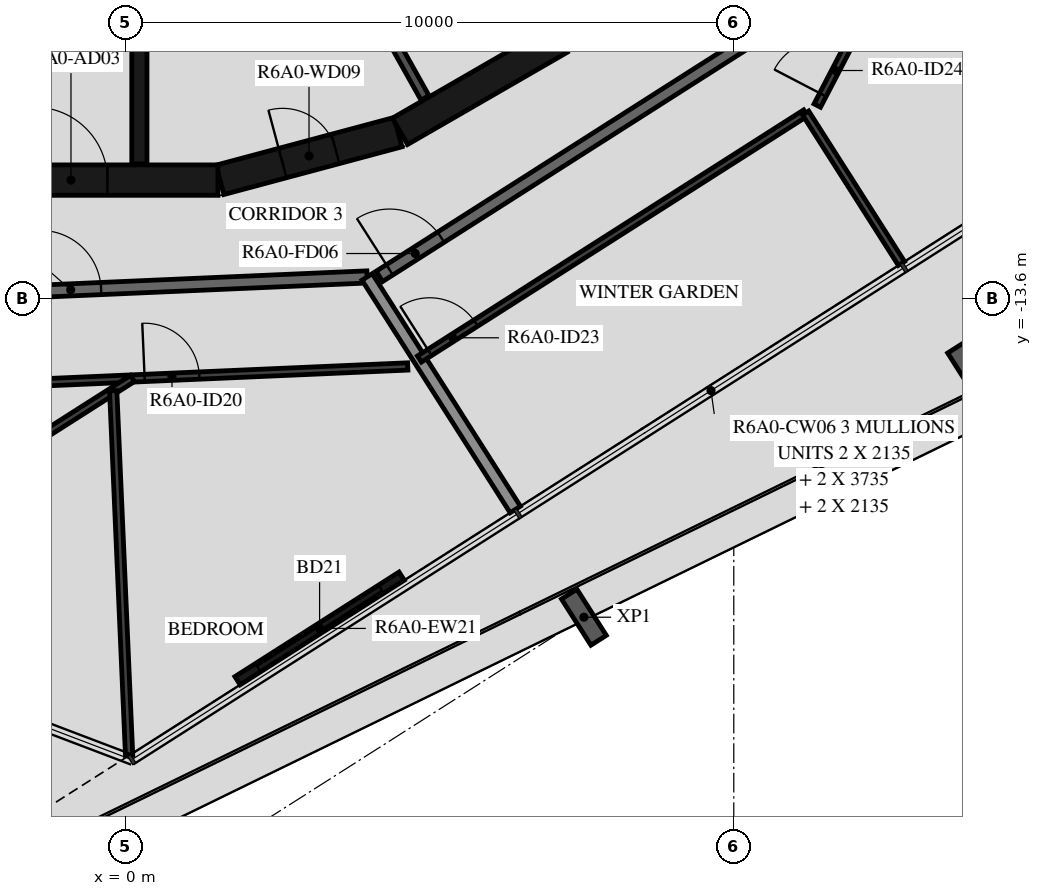
"""IFC4 building model, lengths in metres.
Left out: names, types, materials, properties, quantities, classifications, styles, units other than length and angle.
Written with IfcOpenShell. Run it as: python <this file> out.ifc"""

import sys

from ifc_helpers import new_model, si_unit, direction, frame, frame_2d, origin, origin_2d, place, context, subcontext, project, spatial, rectangle, i_section, extrude, element, fill, save


model = new_model("IFC4")
c1 = context("Model", 3, precision=1e-05, world=origin(), true_north=direction((0.0, 1.0)))
c2 = subcontext(c1, "Body", "Model", "MODEL_VIEW")
j1 = project(units=[si_unit("LENGTHUNIT", "METRE"), si_unit("PLANEANGLEUNIT", "RADIAN")], contexts=[c1])
p1 = place(None, origin())
s1 = spatial("IfcSite", under=j1, at=p1, CompositionType="ELEMENT")
p2 = place(p1, origin())
s2 = spatial("IfcBuilding", under=s1, at=p2, CompositionType="ELEMENT")
p3 = place(p2, frame((0.0, 0.0, 226.7)))
s3 = spatial("IfcBuildingStorey", under=s2, at=p3, CompositionType="ELEMENT", Elevation=226.7)
for number, where, z_axis, x_axis in (
    (1, (13.886, -14.79, -0.45), (0.0, 0.0, 1.0), (-0.843, -0.537, 0.0)),
    (2, (7.535, -18.835, -0.45), (0.0, 0.0, 1.0), (-0.843, -0.537, 0.0)),
):
    element("IfcColumn", number, at=place(p3, frame(where, z_axis=z_axis, x_axis=x_axis)), inside=s3, PredefinedType="COLUMN", context=c2, shape_type="SweptSolid", body=[
        extrude(i_section(OverallWidth=0.3, OverallDepth=0.9, WebThickness=0.019, FlangeThickness=0.035, FilletRadius=0.03, at=origin_2d()), origin(), (0.0, 0.0, 1.0), 3.57),
    ])
p4 = place(p3, frame((1.839, -19.879, 0.0), z_axis=(0.0, 0.0, 1.0), x_axis=(0.843419508298, 0.53725555653, 0.0)))
e3 = element("IfcWall", 3, at=p4, inside=s3, PredefinedType="STANDARD", context=c2, shape_type="SweptSolid", body=[
    extrude(rectangle(XDim=3.2, YDim=0.16, at=frame_2d((1.6, 0.0))), origin(), (0.0, 0.0, 1.0), 3.12),
])
p5 = place(p4, frame((0.4, 0.0, 0.0)))
e4 = element("IfcOpeningElement", 4, at=p5, cuts=e3, PredefinedType="OPENING", context=c2, shape_type="SweptSolid", body=[
    extrude(rectangle(XDim=2.4, YDim=2.4, at=frame_2d((1.2, 1.2))), frame((0.0, 0.09, 0.0), z_axis=(0.0, -1.0, 0.0), x_axis=(1.0, 0.0, 0.0)), (0.0, 0.0, 1.0), 0.18),
])
p6 = place(p3, frame((1.55, -11.643, 0.0), z_axis=(0.0, 0.0, 1.0), x_axis=(0.965948410781, 0.258734743916, 0.0)))
e5 = element("IfcWall", 5, at=p6, inside=s3, PredefinedType="SHEAR", context=c2, shape_type="SweptSolid", body=[
    extrude(rectangle(XDim=3.033, YDim=0.5, at=frame_2d((1.516, 0.0))), origin(), (0.0, 0.0, 1.0), 3.12),
])
p7 = place(p6, frame((1.066, 0.0, 0.0)))
e6 = element("IfcOpeningElement", 6, at=p7, cuts=e5, PredefinedType="OPENING", context=c2, shape_type="SweptSolid", body=[
    extrude(rectangle(XDim=0.9, YDim=2.1, at=frame_2d((0.45, 1.05))), frame((0.0, 0.26, 0.0), z_axis=(0.0, -1.0, 0.0), x_axis=(1.0, 0.0, 0.0)), (0.0, 0.0, 1.0), 0.52),
])
p8 = place(p3, frame((4.51, -10.845, 0.0), z_axis=(0.0, 0.0, 1.0), x_axis=(0.865975092491, 0.500087131594, 0.0)))
e7 = element("IfcWall", 7, at=p8, inside=s3, PredefinedType="SHEAR", context=c2, shape_type="SweptSolid", body=[
    extrude(rectangle(XDim=3.033, YDim=0.5, at=frame_2d((1.516, 0.0))), origin(), (0.0, 0.0, 1.0), 3.12),
])
p9 = place(p3, frame((-1.516, -11.647, 0.0), z_axis=(0.0, 0.0, 1.0), x_axis=(1.0, 0.0, 0.0)))
e8 = element("IfcWall", 8, at=p9, inside=s3, PredefinedType="SHEAR", context=c2, shape_type="SweptSolid", body=[
    extrude(rectangle(XDim=3.033, YDim=0.5, at=frame_2d((1.516, 0.0))), origin(), (0.0, 0.0, 1.0), 3.12),
])
p10 = place(p9, frame((0.016, 0.0, 0.0)))
e9 = element("IfcOpeningElement", 9, at=p10, cuts=e8, PredefinedType="OPENING", context=c2, shape_type="SweptSolid", body=[
    extrude(rectangle(XDim=1.2, YDim=2.1, at=frame_2d((0.6, 1.05))), frame((0.0, 0.26, 0.0), z_axis=(0.0, -1.0, 0.0), x_axis=(1.0, 0.0, 0.0)), (0.0, 0.0, 1.0), 0.52),
])
p11 = place(p3, frame((0.225, -8.97, 0.0), z_axis=(0.0, 0.0, 1.0), x_axis=(0.0, -1.0, 0.0)))
e10 = element("IfcWall", 10, at=p11, inside=s3, PredefinedType="SHEAR", context=c2, shape_type="SweptSolid", body=[
    extrude(rectangle(XDim=2.41, YDim=0.25, at=frame_2d((1.205, 0.0))), origin(), (0.0, 0.0, 1.0), 3.12),
])
p12 = place(p3, frame((4.922, -10.296, 0.0), z_axis=(0.0, 0.0, 1.0), x_axis=(-0.48860846254, 0.872503163509, 0.0)))
e11 = element("IfcWall", 11, at=p12, inside=s3, PredefinedType="PARTITIONING", context=c2, shape_type="SweptSolid", body=[
    extrude(rectangle(XDim=1.459, YDim=0.15, at=frame_2d((0.73, 0.0))), origin(), (0.0, 0.0, 1.0), 3.12),
])
p13 = place(p3, frame((-3.003, -13.544, 0.0), z_axis=(0.0, 0.0, 1.0), x_axis=(0.999048221872, 0.043619380718, 0.0)))
e12 = element("IfcWall", 12, at=p13, inside=s3, PredefinedType="STANDARD", context=c2, shape_type="SweptSolid", body=[
    extrude(rectangle(XDim=6.979, YDim=0.2, at=frame_2d((3.49, 0.0))), origin(), (0.0, 0.0, 1.0), 3.12),
])
p14 = place(p13, frame((1.6, 0.0, 0.0)))
e13 = element("IfcOpeningElement", 13, at=p14, cuts=e12, PredefinedType="OPENING", context=c2, shape_type="SweptSolid", body=[
    extrude(rectangle(XDim=1.0, YDim=2.1, at=frame_2d((0.5, 1.05))), frame((0.0, 0.11, 0.0), z_axis=(0.0, -1.0, 0.0), x_axis=(1.0, 0.0, 0.0)), (0.0, 0.0, 1.0), 0.22),
])
p15 = place(p3, frame((4.172, -13.231, 0.0), z_axis=(0.0, 0.0, 1.0), x_axis=(0.843388394728, 0.537304397561, 0.0)))
e14 = element("IfcWall", 14, at=p15, inside=s3, PredefinedType="STANDARD", context=c2, shape_type="SweptSolid", body=[
    extrude(rectangle(XDim=7.181, YDim=0.2, at=frame_2d((3.59, 0.0))), origin(), (0.0, 0.0, 1.0), 3.12),
])
p16 = place(p15, frame((0.2, 0.0, 0.0)))
e15 = element("IfcOpeningElement", 15, at=p16, cuts=e14, PredefinedType="OPENING", context=c2, shape_type="SweptSolid", body=[
    extrude(rectangle(XDim=1.0, YDim=2.1, at=frame_2d((0.5, 1.05))), frame((0.0, 0.11, 0.0), z_axis=(0.0, -1.0, 0.0), x_axis=(1.0, 0.0, 0.0)), (0.0, 0.0, 1.0), 0.22),
])
p17 = place(p3, frame((6.407, -17.064, 0.0), z_axis=(0.0, 0.0, 1.0), x_axis=(-0.537324777979, 0.843375410461, 0.0)))
e16 = element("IfcWall", 16, at=p17, inside=s3, PredefinedType="STANDARD", context=c2, shape_type="SweptSolid", body=[
    extrude(rectangle(XDim=4.535, YDim=0.2, at=frame_2d((2.268, 0.0))), origin(), (0.0, 0.0, 1.0), 2.73),
])
p18 = place(p3, frame((-3.339, -15.06, 0.0), z_axis=(0.0, 0.0, 1.0), x_axis=(0.999047716945, 0.043630943905, 0.0)))
e17 = element("IfcWall", 17, at=p18, inside=s3, PredefinedType="PARTITIONING", context=c2, shape_type="SweptSolid", body=[
    extrude(rectangle(XDim=7.985, YDim=0.12, at=frame_2d((3.992, 0.0))), origin(), (0.0, 0.0, 1.0), 3.12),
])
p19 = place(p18, frame((3.654, 0.0, 0.0)))
e18 = element("IfcOpeningElement", 18, at=p19, cuts=e17, PredefinedType="OPENING", context=c2, shape_type="SweptSolid", body=[
    extrude(rectangle(XDim=0.9, YDim=2.1, at=frame_2d((0.45, 1.05))), frame((0.0, 0.07, 0.0), z_axis=(0.0, -1.0, 0.0), x_axis=(1.0, 0.0, 0.0)), (0.0, 0.0, 1.0), 0.14),
])
p20 = place(p3, frame((-7.322, -19.645, 0.0), z_axis=(0.0, 0.0, 1.0), x_axis=(0.843385361817, 0.537309158188, 0.0)))
e19 = element("IfcWall", 19, at=p20, inside=s3, PredefinedType="PARTITIONING", context=c2, shape_type="SweptSolid", body=[
    extrude(rectangle(XDim=8.814, YDim=0.12, at=frame_2d((4.407, 0.0))), origin(), (0.0, 0.0, 1.0), 3.12),
])
p21 = place(p20, frame((3.314, 0.0, 0.0)))
e20 = element("IfcOpeningElement", 20, at=p21, cuts=e19, PredefinedType="OPENING", context=c2, shape_type="SweptSolid", body=[
    extrude(rectangle(XDim=0.9, YDim=2.1, at=frame_2d((0.45, 1.05))), frame((0.0, 0.07, 0.0), z_axis=(0.0, -1.0, 0.0), x_axis=(1.0, 0.0, 0.0)), (0.0, 0.0, 1.0), 0.14),
])
p22 = place(p3, frame((0.056, -21.11, 0.0), z_axis=(0.0, 0.0, 1.0), x_axis=(-0.043629559022, 0.999047777426, 0.0)))
e21 = element("IfcWall", 21, at=p22, inside=s3, PredefinedType="PARTITIONING", context=c2, shape_type="SweptSolid", body=[
    extrude(rectangle(XDim=6.004, YDim=0.12, at=frame_2d((3.002, 0.0))), origin(), (0.0, 0.0, 1.0), 3.12),
])
p23 = place(p3, frame((4.83, -14.59, 0.0), z_axis=(0.0, 0.0, 1.0), x_axis=(0.843393042763, 0.537297101629, 0.0)))
e22 = element("IfcWall", 22, at=p23, inside=s3, PredefinedType="PARTITIONING", context=c2, shape_type="SweptSolid", body=[
    extrude(rectangle(XDim=7.53, YDim=0.12, at=frame_2d((3.765, 0.0))), origin(), (0.0, 0.0, 1.0), 3.12),
])
p24 = place(p23, frame((0.2, 0.0, 0.0)))
e23 = element("IfcOpeningElement", 23, at=p24, cuts=e22, PredefinedType="OPENING", context=c2, shape_type="SweptSolid", body=[
    extrude(rectangle(XDim=0.9, YDim=2.1, at=frame_2d((0.45, 1.05))), frame((0.0, 0.07, 0.0), z_axis=(0.0, -1.0, 0.0), x_axis=(1.0, 0.0, 0.0)), (0.0, 0.0, 1.0), 0.14),
])
p25 = place(p3, frame((11.373, -10.421, 0.0), z_axis=(0.0, 0.0, 1.0), x_axis=(0.461738939635, 0.887015868869, 0.0)))
e24 = element("IfcWall", 24, at=p25, inside=s3, PredefinedType="PARTITIONING", context=c2, shape_type="SweptSolid", body=[
    extrude(rectangle(XDim=5.752, YDim=0.12, at=frame_2d((2.876, 0.0))), origin(), (0.0, 0.0, 1.0), 3.12),
])
p26 = place(p25, frame((0.2, 0.0, 0.0)))
e25 = element("IfcOpeningElement", 25, at=p26, cuts=e24, PredefinedType="OPENING", context=c2, shape_type="SweptSolid", body=[
    extrude(rectangle(XDim=0.9, YDim=2.1, at=frame_2d((0.45, 1.05))), frame((0.0, 0.07, 0.0), z_axis=(0.0, -1.0, 0.0), x_axis=(1.0, 0.0, 0.0)), (0.0, 0.0, 1.0), 0.14),
])
p27 = place(p3, frame((12.758, -13.018, 0.0), z_axis=(0.0, 0.0, 1.0), x_axis=(-0.537338423153, 0.843366716798, 0.0)))
e26 = element("IfcWall", 26, at=p27, inside=s3, PredefinedType="PARTITIONING", context=c2, shape_type="SweptSolid", body=[
    extrude(rectangle(XDim=2.934, YDim=0.12, at=frame_2d((1.467, 0.0))), origin(), (0.0, 0.0, 1.0), 2.73),
])
p28 = place(p5, origin())
e27 = element("IfcDoor", 27, at=p28, inside=s3, OperationType="DOUBLE_DOOR_SLIDING", PredefinedType="DOOR", context=c2, shape_type="SweptSolid", body=[
    extrude(rectangle(XDim=2.4, YDim=2.4, at=frame_2d((1.2, 1.2))), frame((0.0, 0.025, 0.0), z_axis=(0.0, -1.0, 0.0), x_axis=(1.0, 0.0, 0.0)), (0.0, 0.0, 1.0), 0.05),
])
fill(e4, e27)
p29 = place(p10, origin())
e28 = element("IfcDoor", 28, at=p29, inside=s3, OperationType="SINGLE_SWING_RIGHT", PredefinedType="DOOR", context=c2, shape_type="SweptSolid", body=[
    extrude(rectangle(XDim=1.2, YDim=2.1, at=frame_2d((0.6, 1.05))), frame((0.0, 0.025, 0.0), z_axis=(0.0, -1.0, 0.0), x_axis=(1.0, 0.0, 0.0)), (0.0, 0.0, 1.0), 0.05),
])
fill(e9, e28)
p30 = place(p7, origin())
e29 = element("IfcDoor", 29, at=p30, inside=s3, OperationType="SINGLE_SWING_LEFT", PredefinedType="DOOR", context=c2, shape_type="SweptSolid", body=[
    extrude(rectangle(XDim=0.9, YDim=2.1, at=frame_2d((0.45, 1.05))), frame((0.0, 0.025, 0.0), z_axis=(0.0, -1.0, 0.0), x_axis=(1.0, 0.0, 0.0)), (0.0, 0.0, 1.0), 0.05),
])
fill(e6, e29)
p31 = place(p14, origin())
e30 = element("IfcDoor", 30, at=p31, inside=s3, OperationType="SINGLE_SWING_LEFT", PredefinedType="DOOR", context=c2, shape_type="SweptSolid", body=[
    extrude(rectangle(XDim=1.0, YDim=2.1, at=frame_2d((0.5, 1.05))), frame((0.0, 0.025, 0.0), z_axis=(0.0, -1.0, 0.0), x_axis=(1.0, 0.0, 0.0)), (0.0, 0.0, 1.0), 0.05),
])
fill(e13, e30)
p32 = place(p19, origin())
e31 = element("IfcDoor", 31, at=p32, inside=s3, OperationType="SINGLE_SWING_LEFT", PredefinedType="DOOR", context=c2, shape_type="SweptSolid", body=[
    extrude(rectangle(XDim=0.9, YDim=2.1, at=frame_2d((0.45, 1.05))), frame((0.0, 0.025, 0.0), z_axis=(0.0, -1.0, 0.0), x_axis=(1.0, 0.0, 0.0)), (0.0, 0.0, 1.0), 0.05),
])
fill(e18, e31)
p33 = place(p16, origin())
e32 = element("IfcDoor", 32, at=p33, inside=s3, OperationType="SINGLE_SWING_LEFT", PredefinedType="DOOR", context=c2, shape_type="SweptSolid", body=[
    extrude(rectangle(XDim=1.0, YDim=2.1, at=frame_2d((0.5, 1.05))), frame((0.0, 0.025, 0.0), z_axis=(0.0, -1.0, 0.0), x_axis=(1.0, 0.0, 0.0)), (0.0, 0.0, 1.0), 0.05),
])
fill(e15, e32)
p34 = place(p24, origin())
e33 = element("IfcDoor", 33, at=p34, inside=s3, OperationType="SINGLE_SWING_LEFT", PredefinedType="DOOR", context=c2, shape_type="SweptSolid", body=[
    extrude(rectangle(XDim=0.9, YDim=2.1, at=frame_2d((0.45, 1.05))), frame((0.0, 0.025, 0.0), z_axis=(0.0, -1.0, 0.0), x_axis=(1.0, 0.0, 0.0)), (0.0, 0.0, 1.0), 0.05),
])
fill(e23, e33)
p35 = place(p26, origin())
e34 = element("IfcDoor", 34, at=p35, inside=s3, OperationType="SINGLE_SWING_RIGHT", PredefinedType="DOOR", context=c2, shape_type="SweptSolid", body=[
    extrude(rectangle(XDim=0.9, YDim=2.1, at=frame_2d((0.45, 1.05))), frame((0.0, 0.025, 0.0), z_axis=(0.0, -1.0, 0.0), x_axis=(1.0, 0.0, 0.0)), (0.0, 0.0, 1.0), 0.05),
])
fill(e25, e34)
save(model, sys.argv[1])
